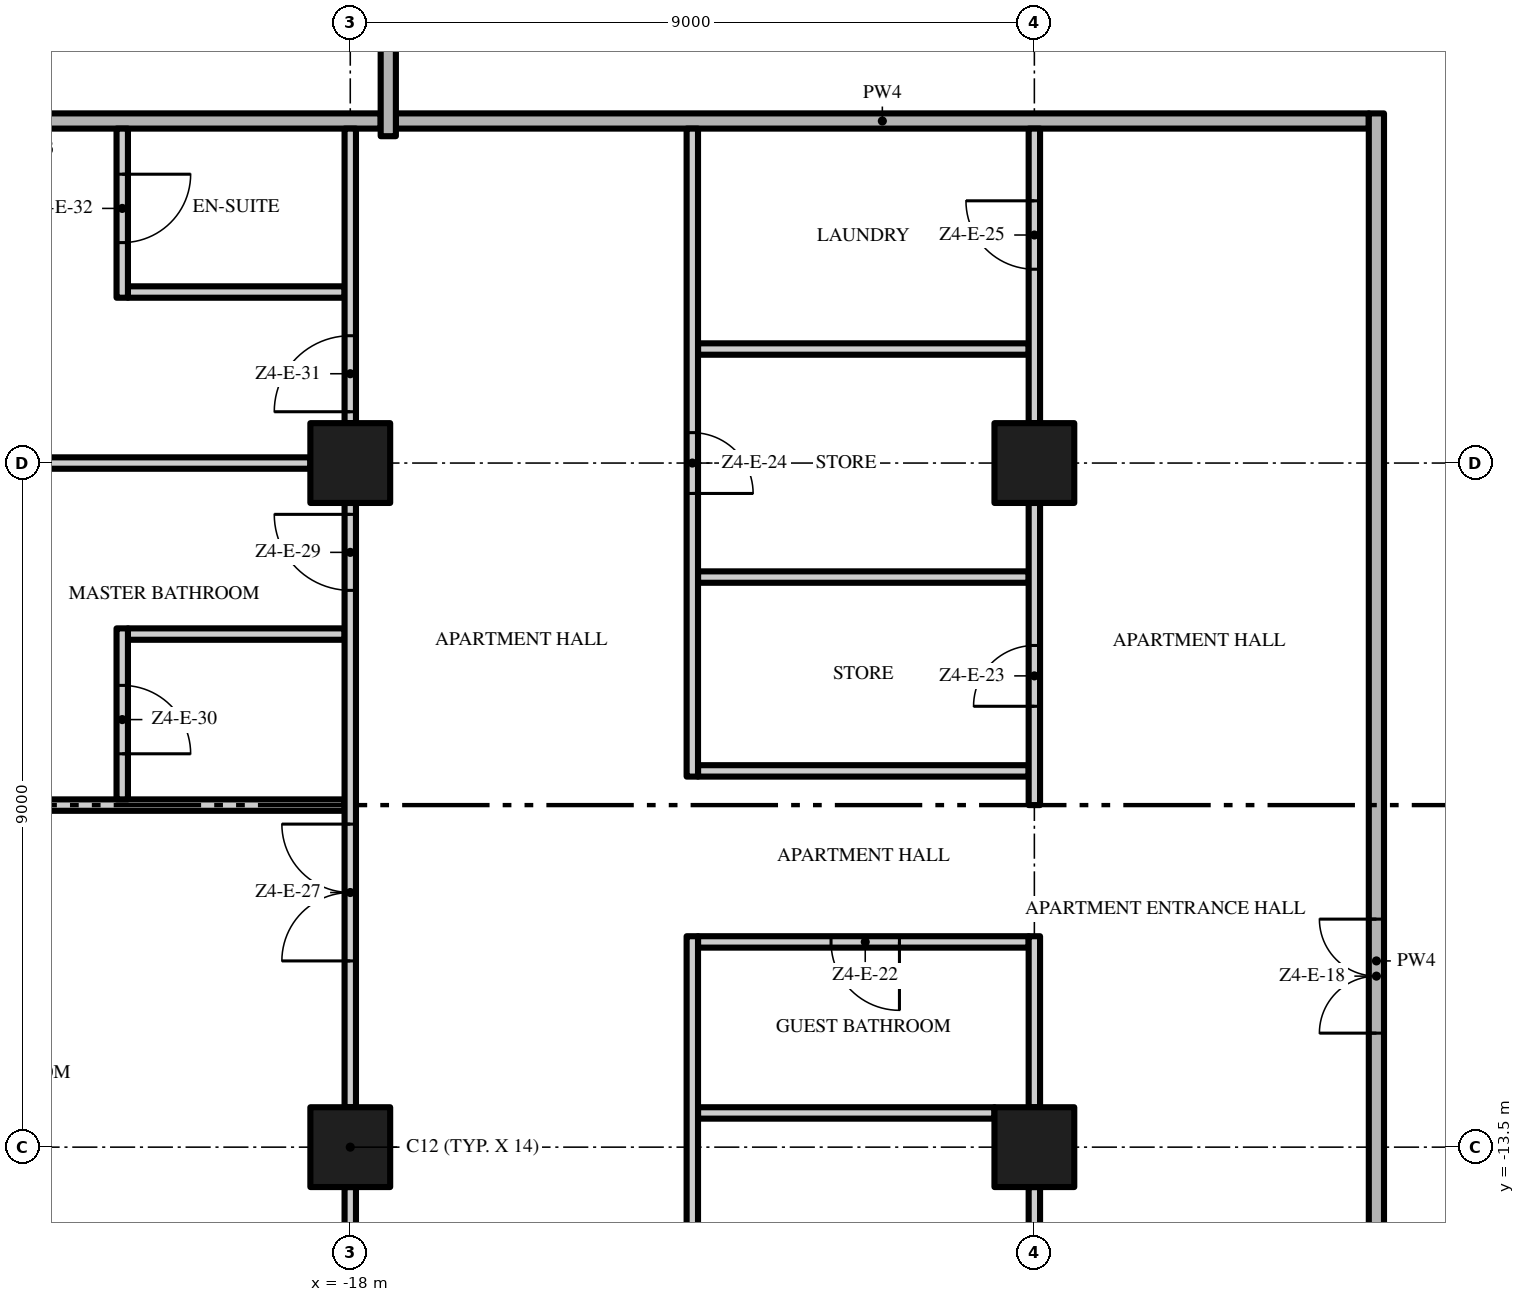
"""IFC4 building model, lengths in metres.
Left out: names, types, materials, properties, quantities, classifications, styles, units other than length and angle.
Written with IfcOpenShell. Run it as: python <this file> out.ifc"""

import sys

from ifc_helpers import new_model, si_unit, direction, frame, frame_2d, origin, origin_2d, place, context, subcontext, project, spatial, rectangle, extrude, element, fill, save


model = new_model("IFC4")
c1 = context("Model", 3, precision=1e-05, world=origin(), true_north=direction((0.0, 1.0)))
c2 = subcontext(c1, "Body", "Model", "MODEL_VIEW")
j1 = project(units=[si_unit("LENGTHUNIT", "METRE"), si_unit("PLANEANGLEUNIT", "RADIAN")], contexts=[c1])
p1 = place(None, origin())
s1 = spatial("IfcSite", under=j1, at=p1, CompositionType="ELEMENT")
p2 = place(p1, origin())
s2 = spatial("IfcBuilding", under=s1, at=p2, CompositionType="ELEMENT")
p3 = place(p2, frame((0.0, 0.0, 230.0)))
s3 = spatial("IfcBuildingStorey", under=s2, at=p3, CompositionType="ELEMENT", Elevation=230.0)
for number, where, z_axis, x_axis in (
    (1, (-18.0, -13.5, 0.0), (0.0, 0.0, 1.0), (1.0, 0.0, 0.0)),
    (2, (-18.0, -4.5, 0.0), (0.0, 0.0, 1.0), (1.0, 0.0, 0.0)),
    (3, (-9.0, -13.5, 0.0), (0.0, 0.0, 1.0), (1.0, 0.0, 0.0)),
    (4, (-9.0, -4.5, 0.0), (0.0, 0.0, 1.0), (1.0, 0.0, 0.0)),
):
    element("IfcColumn", number, at=place(p3, frame(where, z_axis=z_axis, x_axis=x_axis)), inside=s3, PredefinedType="COLUMN", context=c2, shape_type="SweptSolid", body=[
        extrude(rectangle(XDim=1.05, YDim=1.05, at=origin_2d()), origin(), (0.0, 0.0, 1.0), 3.5),
    ])
p4 = place(p3, frame((-13.425, -13.05, 0.0), z_axis=(0.0, 0.0, 1.0), x_axis=(1.0, 0.0, 0.0)))
e5 = element("IfcWall", 5, at=p4, inside=s3, PredefinedType="PARTITIONING", context=c2, shape_type="SweptSolid", body=[
    extrude(rectangle(XDim=3.9, YDim=0.15, at=frame_2d((1.95, 0.0))), origin(), (0.0, 0.0, 1.0), 3.5),
])
p5 = place(p3, frame((-9.075, -10.8, 0.0), z_axis=(0.0, 0.0, 1.0), x_axis=(-1.0, 0.0, 0.0)))
e6 = element("IfcWall", 6, at=p5, inside=s3, PredefinedType="PARTITIONING", context=c2, shape_type="SweptSolid", body=[
    extrude(rectangle(XDim=4.35, YDim=0.15, at=frame_2d((2.175, 0.0))), origin(), (0.0, 0.0, 1.0), 3.5),
])
p6 = place(p5, frame((1.7, 0.0, 0.0)))
e7 = element("IfcOpeningElement", 7, at=p6, cuts=e6, PredefinedType="OPENING", context=c2, shape_type="SweptSolid", body=[
    extrude(rectangle(XDim=0.9, YDim=2.1, at=frame_2d((0.45, 1.05))), frame((0.0, 0.085, 0.0), z_axis=(0.0, -1.0, 0.0), x_axis=(1.0, 0.0, 0.0)), (0.0, 0.0, 1.0), 0.17),
])
p7 = place(p3, frame((-26.7, -9.0, 0.0), z_axis=(0.0, 0.0, 1.0), x_axis=(1.0, 0.0, 0.0)))
e8 = element("IfcWall", 8, at=p7, inside=s3, PredefinedType="PARTITIONING", context=c2, shape_type="SweptSolid", body=[
    extrude(rectangle(XDim=8.625, YDim=0.15, at=frame_2d((4.312, 0.0))), origin(), (0.0, 0.0, 1.0), 3.5),
])
p8 = place(p3, frame((-13.425, -8.55, 0.0), z_axis=(0.0, 0.0, 1.0), x_axis=(1.0, 0.0, 0.0)))
e9 = element("IfcWall", 9, at=p8, inside=s3, PredefinedType="PARTITIONING", context=c2, shape_type="SweptSolid", body=[
    extrude(rectangle(XDim=4.35, YDim=0.15, at=frame_2d((2.175, 0.0))), origin(), (0.0, 0.0, 1.0), 3.5),
])
p9 = place(p3, frame((-20.925, -6.75, 0.0), z_axis=(0.0, 0.0, 1.0), x_axis=(1.0, 0.0, 0.0)))
e10 = element("IfcWall", 10, at=p9, inside=s3, PredefinedType="PARTITIONING", context=c2, shape_type="SweptSolid", body=[
    extrude(rectangle(XDim=2.85, YDim=0.15, at=frame_2d((1.425, 0.0))), origin(), (0.0, 0.0, 1.0), 3.5),
])
p10 = place(p3, frame((-13.425, -6.0, 0.0), z_axis=(0.0, 0.0, 1.0), x_axis=(1.0, 0.0, 0.0)))
e11 = element("IfcWall", 11, at=p10, inside=s3, PredefinedType="PARTITIONING", context=c2, shape_type="SweptSolid", body=[
    extrude(rectangle(XDim=4.35, YDim=0.15, at=frame_2d((2.175, 0.0))), origin(), (0.0, 0.0, 1.0), 3.5),
])
p11 = place(p3, frame((-26.05, -4.5, 0.0), z_axis=(0.0, 0.0, 1.0), x_axis=(1.0, 0.0, 0.0)))
e12 = element("IfcWall", 12, at=p11, inside=s3, PredefinedType="PARTITIONING", context=c2, shape_type="SweptSolid", body=[
    extrude(rectangle(XDim=7.525, YDim=0.15, at=frame_2d((3.763, 0.0))), origin(), (0.0, 0.0, 1.0), 3.5),
])
p12 = place(p3, frame((-13.425, -3.0, 0.0), z_axis=(0.0, 0.0, 1.0), x_axis=(1.0, 0.0, 0.0)))
e13 = element("IfcWall", 13, at=p12, inside=s3, PredefinedType="PARTITIONING", context=c2, shape_type="SweptSolid", body=[
    extrude(rectangle(XDim=4.35, YDim=0.15, at=frame_2d((2.175, 0.0))), origin(), (0.0, 0.0, 1.0), 3.5),
])
p13 = place(p3, frame((-20.925, -2.25, 0.0), z_axis=(0.0, 0.0, 1.0), x_axis=(1.0, 0.0, 0.0)))
e14 = element("IfcWall", 14, at=p13, inside=s3, PredefinedType="PARTITIONING", context=c2, shape_type="SweptSolid", body=[
    extrude(rectangle(XDim=2.85, YDim=0.15, at=frame_2d((1.425, 0.0))), origin(), (0.0, 0.0, 1.0), 3.5),
])
p14 = place(p3, frame((-17.4, 0.0, 0.0), z_axis=(0.0, 0.0, 1.0), x_axis=(1.0, 0.0, 0.0)))
e15 = element("IfcWall", 15, at=p14, inside=s3, PredefinedType="PARTITIONING", context=c2, shape_type="SweptSolid", body=[
    extrude(rectangle(XDim=12.8, YDim=0.2, at=frame_2d((6.4, 0.0))), origin(), (0.0, 0.0, 1.0), 3.5),
])
p15 = place(p3, frame((-26.7, 0.0, 0.0), z_axis=(0.0, 0.0, 1.0), x_axis=(1.0, 0.0, 0.0)))
e16 = element("IfcWall", 16, at=p15, inside=s3, PredefinedType="PARTITIONING", context=c2, shape_type="SweptSolid", body=[
    extrude(rectangle(XDim=9.1, YDim=0.2, at=frame_2d((4.55, 0.0))), origin(), (0.0, 0.0, 1.0), 3.5),
])
p16 = place(p3, frame((-21.0, -6.675, 0.0), z_axis=(0.0, 0.0, 1.0), x_axis=(0.0, -1.0, 0.0)))
e17 = element("IfcWall", 17, at=p16, inside=s3, PredefinedType="PARTITIONING", context=c2, shape_type="SweptSolid", body=[
    extrude(rectangle(XDim=2.25, YDim=0.15, at=frame_2d((1.125, 0.0))), origin(), (0.0, 0.0, 1.0), 3.5),
])
p17 = place(p16, frame((0.75, 0.0, 0.0)))
e18 = element("IfcOpeningElement", 18, at=p17, cuts=e17, PredefinedType="OPENING", context=c2, shape_type="SweptSolid", body=[
    extrude(rectangle(XDim=0.9, YDim=2.1, at=frame_2d((0.45, 1.05))), frame((0.0, 0.085, 0.0), z_axis=(0.0, -1.0, 0.0), x_axis=(1.0, 0.0, 0.0)), (0.0, 0.0, 1.0), 0.17),
])
p18 = place(p3, frame((-21.0, -0.1, 0.0), z_axis=(0.0, 0.0, 1.0), x_axis=(0.0, -1.0, 0.0)))
e19 = element("IfcWall", 19, at=p18, inside=s3, PredefinedType="PARTITIONING", context=c2, shape_type="SweptSolid", body=[
    extrude(rectangle(XDim=2.225, YDim=0.15, at=frame_2d((1.113, 0.0))), origin(), (0.0, 0.0, 1.0), 3.5),
])
p19 = place(p18, frame((0.6, 0.0, 0.0)))
e20 = element("IfcOpeningElement", 20, at=p19, cuts=e19, PredefinedType="OPENING", context=c2, shape_type="SweptSolid", body=[
    extrude(rectangle(XDim=0.9, YDim=2.1, at=frame_2d((0.45, 1.05))), frame((0.0, 0.085, 0.0), z_axis=(0.0, -1.0, 0.0), x_axis=(1.0, 0.0, 0.0)), (0.0, 0.0, 1.0), 0.17),
])
p20 = place(p3, frame((-18.0, -21.55, 0.0), z_axis=(0.0, 0.0, 1.0), x_axis=(0.0, 1.0, 0.0)))
e21 = element("IfcWall", 21, at=p20, inside=s3, PredefinedType="PARTITIONING", context=c2, shape_type="SweptSolid", body=[
    extrude(rectangle(XDim=7.525, YDim=0.15, at=frame_2d((3.763, 0.0))), origin(), (0.0, 0.0, 1.0), 3.5),
])
p21 = place(p20, frame((0.55, 0.0, 0.0)))
e22 = element("IfcOpeningElement", 22, at=p21, cuts=e21, PredefinedType="OPENING", context=c2, shape_type="SweptSolid", body=[
    extrude(rectangle(XDim=1.5, YDim=2.4, at=frame_2d((0.75, 1.2))), frame((0.0, 0.085, 0.0), z_axis=(0.0, -1.0, 0.0), x_axis=(1.0, 0.0, 0.0)), (0.0, 0.0, 1.0), 0.17),
])
p22 = place(p3, frame((-18.0, -12.975, 0.0), z_axis=(0.0, 0.0, 1.0), x_axis=(0.0, 1.0, 0.0)))
e23 = element("IfcWall", 23, at=p22, inside=s3, PredefinedType="PARTITIONING", context=c2, shape_type="SweptSolid", body=[
    extrude(rectangle(XDim=7.95, YDim=0.15, at=frame_2d((3.975, 0.0))), origin(), (0.0, 0.0, 1.0), 3.5),
])
p23 = place(p22, frame((1.925, 0.0, 0.0)))
e24 = element("IfcOpeningElement", 24, at=p23, cuts=e23, PredefinedType="OPENING", context=c2, shape_type="SweptSolid", body=[
    extrude(rectangle(XDim=1.8, YDim=2.4, at=frame_2d((0.9, 1.2))), frame((0.0, 0.085, 0.0), z_axis=(0.0, -1.0, 0.0), x_axis=(1.0, 0.0, 0.0)), (0.0, 0.0, 1.0), 0.17),
])
p24 = place(p22, frame((6.8, 0.0, 0.0)))
e25 = element("IfcOpeningElement", 25, at=p24, cuts=e23, PredefinedType="OPENING", context=c2, shape_type="SweptSolid", body=[
    extrude(rectangle(XDim=1.0, YDim=2.4, at=frame_2d((0.5, 1.2))), frame((0.0, 0.085, 0.0), z_axis=(0.0, -1.0, 0.0), x_axis=(1.0, 0.0, 0.0)), (0.0, 0.0, 1.0), 0.17),
])
p25 = place(p3, frame((-18.0, -3.975, 0.0), z_axis=(0.0, 0.0, 1.0), x_axis=(0.0, 1.0, 0.0)))
e26 = element("IfcWall", 26, at=p25, inside=s3, PredefinedType="PARTITIONING", context=c2, shape_type="SweptSolid", body=[
    extrude(rectangle(XDim=3.875, YDim=0.15, at=frame_2d((1.938, 0.0))), origin(), (0.0, 0.0, 1.0), 3.5),
])
p26 = place(p25, frame((0.15, 0.0, 0.0)))
e27 = element("IfcOpeningElement", 27, at=p26, cuts=e26, PredefinedType="OPENING", context=c2, shape_type="SweptSolid", body=[
    extrude(rectangle(XDim=1.0, YDim=2.4, at=frame_2d((0.5, 1.2))), frame((0.0, 0.085, 0.0), z_axis=(0.0, -1.0, 0.0), x_axis=(1.0, 0.0, 0.0)), (0.0, 0.0, 1.0), 0.17),
])
p27 = place(p3, frame((-17.5, -0.2, 0.0), z_axis=(0.0, 0.0, 1.0), x_axis=(0.0, 1.0, 0.0)))
e28 = element("IfcWall", 28, at=p27, inside=s3, PredefinedType="PARTITIONING", context=c2, shape_type="SweptSolid", body=[
    extrude(rectangle(XDim=4.175, YDim=0.2, at=frame_2d((2.087, 0.0))), origin(), (0.0, 0.0, 1.0), 3.5),
])
p28 = place(p3, frame((-13.5, -10.725, 0.0), z_axis=(0.0, 0.0, 1.0), x_axis=(0.0, -1.0, 0.0)))
e29 = element("IfcWall", 29, at=p28, inside=s3, PredefinedType="PARTITIONING", context=c2, shape_type="SweptSolid", body=[
    extrude(rectangle(XDim=11.475, YDim=0.15, at=frame_2d((5.737, 0.0))), origin(), (0.0, 0.0, 1.0), 3.5),
])
p29 = place(p28, frame((10.475, 0.0, 0.0)))
e30 = element("IfcOpeningElement", 30, at=p29, cuts=e29, PredefinedType="OPENING", context=c2, shape_type="SweptSolid", body=[
    extrude(rectangle(XDim=0.8, YDim=2.0, at=frame_2d((0.4, 1.0))), frame((0.0, 0.085, 0.0), z_axis=(0.0, -1.0, 0.0), x_axis=(1.0, 0.0, 0.0)), (0.0, 0.0, 1.0), 0.17),
])
p30 = place(p28, frame((4.825, 0.0, 0.0)))
e31 = element("IfcOpeningElement", 31, at=p30, cuts=e29, PredefinedType="OPENING", context=c2, shape_type="SweptSolid", body=[
    extrude(rectangle(XDim=1.0, YDim=2.4, at=frame_2d((0.5, 1.2))), frame((0.0, 0.085, 0.0), z_axis=(0.0, -1.0, 0.0), x_axis=(1.0, 0.0, 0.0)), (0.0, 0.0, 1.0), 0.17),
])
p31 = place(p3, frame((-13.5, -0.1, 0.0), z_axis=(0.0, 0.0, 1.0), x_axis=(0.0, -1.0, 0.0)))
e32 = element("IfcWall", 32, at=p31, inside=s3, PredefinedType="PARTITIONING", context=c2, shape_type="SweptSolid", body=[
    extrude(rectangle(XDim=8.525, YDim=0.15, at=frame_2d((4.263, 0.0))), origin(), (0.0, 0.0, 1.0), 3.5),
])
p32 = place(p31, frame((4.0, 0.0, 0.0)))
e33 = element("IfcOpeningElement", 33, at=p32, cuts=e32, PredefinedType="OPENING", context=c2, shape_type="SweptSolid", body=[
    extrude(rectangle(XDim=0.8, YDim=2.0, at=frame_2d((0.4, 1.0))), frame((0.0, 0.085, 0.0), z_axis=(0.0, -1.0, 0.0), x_axis=(1.0, 0.0, 0.0)), (0.0, 0.0, 1.0), 0.17),
])
p33 = place(p3, frame((-9.0, -21.55, 0.0), z_axis=(0.0, 0.0, 1.0), x_axis=(0.0, 1.0, 0.0)))
e34 = element("IfcWall", 34, at=p33, inside=s3, PredefinedType="PARTITIONING", context=c2, shape_type="SweptSolid", body=[
    extrude(rectangle(XDim=7.525, YDim=0.15, at=frame_2d((3.763, 0.0))), origin(), (0.0, 0.0, 1.0), 3.5),
])
p34 = place(p33, frame((1.25, 0.0, 0.0)))
e35 = element("IfcOpeningElement", 35, at=p34, cuts=e34, PredefinedType="OPENING", context=c2, shape_type="SweptSolid", body=[
    extrude(rectangle(XDim=0.8, YDim=2.0, at=frame_2d((0.4, 1.0))), frame((0.0, 0.085, 0.0), z_axis=(0.0, -1.0, 0.0), x_axis=(1.0, 0.0, 0.0)), (0.0, 0.0, 1.0), 0.17),
])
p35 = place(p3, frame((-9.0, -12.975, 0.0), z_axis=(0.0, 0.0, 1.0), x_axis=(0.0, 1.0, 0.0)))
e36 = element("IfcWall", 36, at=p35, inside=s3, PredefinedType="PARTITIONING", context=c2, shape_type="SweptSolid", body=[
    extrude(rectangle(XDim=2.25, YDim=0.15, at=frame_2d((1.125, 0.0))), origin(), (0.0, 0.0, 1.0), 3.5),
])
p36 = place(p3, frame((-9.0, -9.0, 0.0), z_axis=(0.0, 0.0, 1.0), x_axis=(0.0, 1.0, 0.0)))
e37 = element("IfcWall", 37, at=p36, inside=s3, PredefinedType="PARTITIONING", context=c2, shape_type="SweptSolid", body=[
    extrude(rectangle(XDim=3.975, YDim=0.15, at=frame_2d((1.988, 0.0))), origin(), (0.0, 0.0, 1.0), 3.5),
])
p37 = place(p36, frame((1.3, 0.0, 0.0)))
e38 = element("IfcOpeningElement", 38, at=p37, cuts=e37, PredefinedType="OPENING", context=c2, shape_type="SweptSolid", body=[
    extrude(rectangle(XDim=0.8, YDim=2.0, at=frame_2d((0.4, 1.0))), frame((0.0, 0.085, 0.0), z_axis=(0.0, -1.0, 0.0), x_axis=(1.0, 0.0, 0.0)), (0.0, 0.0, 1.0), 0.17),
])
p38 = place(p3, frame((-9.0, -3.975, 0.0), z_axis=(0.0, 0.0, 1.0), x_axis=(0.0, 1.0, 0.0)))
e39 = element("IfcWall", 39, at=p38, inside=s3, PredefinedType="PARTITIONING", context=c2, shape_type="SweptSolid", body=[
    extrude(rectangle(XDim=3.875, YDim=0.15, at=frame_2d((1.938, 0.0))), origin(), (0.0, 0.0, 1.0), 3.5),
])
p39 = place(p38, frame((2.025, 0.0, 0.0)))
e40 = element("IfcOpeningElement", 40, at=p39, cuts=e39, PredefinedType="OPENING", context=c2, shape_type="SweptSolid", body=[
    extrude(rectangle(XDim=0.9, YDim=2.1, at=frame_2d((0.45, 1.05))), frame((0.0, 0.085, 0.0), z_axis=(0.0, -1.0, 0.0), x_axis=(1.0, 0.0, 0.0)), (0.0, 0.0, 1.0), 0.17),
])
p40 = place(p3, frame((-4.5, -22.2, 0.0), z_axis=(0.0, 0.0, 1.0), x_axis=(0.0, 1.0, 0.0)))
e41 = element("IfcWall", 41, at=p40, inside=s3, PredefinedType="PARTITIONING", context=c2, shape_type="SweptSolid", body=[
    extrude(rectangle(XDim=22.3, YDim=0.2, at=frame_2d((11.15, 0.0))), origin(), (0.0, 0.0, 1.0), 3.5),
])
p41 = place(p40, frame((10.2, 0.0, 0.0)))
e42 = element("IfcOpeningElement", 42, at=p41, cuts=e41, PredefinedType="OPENING", context=c2, shape_type="SweptSolid", body=[
    extrude(rectangle(XDim=1.5, YDim=2.4, at=frame_2d((0.75, 1.2))), frame((0.0, 0.11, 0.0), z_axis=(0.0, -1.0, 0.0), x_axis=(1.0, 0.0, 0.0)), (0.0, 0.0, 1.0), 0.22),
])
p42 = place(p41, origin())
e43 = element("IfcDoor", 43, at=p42, inside=s3, OperationType="DOUBLE_DOOR_SINGLE_SWING", PredefinedType="DOOR", context=c2, shape_type="SweptSolid", body=[
    extrude(rectangle(XDim=1.5, YDim=2.4, at=frame_2d((0.75, 1.2))), frame((0.0, 0.025, 0.0), z_axis=(0.0, -1.0, 0.0), x_axis=(1.0, 0.0, 0.0)), (0.0, 0.0, 1.0), 0.05),
])
fill(e42, e43)
p43 = place(p6, origin())
e44 = element("IfcDoor", 44, at=p43, inside=s3, OperationType="SINGLE_SWING_LEFT", PredefinedType="DOOR", context=c2, shape_type="SweptSolid", body=[
    extrude(rectangle(XDim=0.9, YDim=2.1, at=frame_2d((0.45, 1.05))), frame((0.0, 0.025, 0.0), z_axis=(0.0, -1.0, 0.0), x_axis=(1.0, 0.0, 0.0)), (0.0, 0.0, 1.0), 0.05),
])
fill(e7, e44)
p44 = place(p37, origin())
e45 = element("IfcDoor", 45, at=p44, inside=s3, OperationType="SINGLE_SWING_LEFT", PredefinedType="DOOR", context=c2, shape_type="SweptSolid", body=[
    extrude(rectangle(XDim=0.8, YDim=2.0, at=frame_2d((0.4, 1.0))), frame((0.0, 0.025, 0.0), z_axis=(0.0, -1.0, 0.0), x_axis=(1.0, 0.0, 0.0)), (0.0, 0.0, 1.0), 0.05),
])
fill(e38, e45)
p45 = place(p32, origin())
e46 = element("IfcDoor", 46, at=p45, inside=s3, OperationType="SINGLE_SWING_RIGHT", PredefinedType="DOOR", context=c2, shape_type="SweptSolid", body=[
    extrude(rectangle(XDim=0.8, YDim=2.0, at=frame_2d((0.4, 1.0))), frame((0.0, 0.025, 0.0), z_axis=(0.0, -1.0, 0.0), x_axis=(1.0, 0.0, 0.0)), (0.0, 0.0, 1.0), 0.05),
])
fill(e33, e46)
p46 = place(p39, origin())
e47 = element("IfcDoor", 47, at=p46, inside=s3, OperationType="SINGLE_SWING_RIGHT", PredefinedType="DOOR", context=c2, shape_type="SweptSolid", body=[
    extrude(rectangle(XDim=0.9, YDim=2.1, at=frame_2d((0.45, 1.05))), frame((0.0, 0.025, 0.0), z_axis=(0.0, -1.0, 0.0), x_axis=(1.0, 0.0, 0.0)), (0.0, 0.0, 1.0), 0.05),
])
fill(e40, e47)
p47 = place(p23, origin())
e48 = element("IfcDoor", 48, at=p47, inside=s3, OperationType="DOUBLE_DOOR_SINGLE_SWING", PredefinedType="DOOR", context=c2, shape_type="SweptSolid", body=[
    extrude(rectangle(XDim=1.8, YDim=2.4, at=frame_2d((0.9, 1.2))), frame((0.0, 0.025, 0.0), z_axis=(0.0, -1.0, 0.0), x_axis=(1.0, 0.0, 0.0)), (0.0, 0.0, 1.0), 0.05),
])
fill(e24, e48)
p48 = place(p24, origin())
e49 = element("IfcDoor", 49, at=p48, inside=s3, OperationType="SINGLE_SWING_RIGHT", PredefinedType="DOOR", context=c2, shape_type="SweptSolid", body=[
    extrude(rectangle(XDim=1.0, YDim=2.4, at=frame_2d((0.5, 1.2))), frame((0.0, 0.025, 0.0), z_axis=(0.0, -1.0, 0.0), x_axis=(1.0, 0.0, 0.0)), (0.0, 0.0, 1.0), 0.05),
])
fill(e25, e49)
p49 = place(p17, origin())
e50 = element("IfcDoor", 50, at=p49, inside=s3, OperationType="SINGLE_SWING_RIGHT", PredefinedType="DOOR", context=c2, shape_type="SweptSolid", body=[
    extrude(rectangle(XDim=0.9, YDim=2.1, at=frame_2d((0.45, 1.05))), frame((0.0, 0.025, 0.0), z_axis=(0.0, -1.0, 0.0), x_axis=(1.0, 0.0, 0.0)), (0.0, 0.0, 1.0), 0.05),
])
fill(e18, e50)
p50 = place(p26, origin())
e51 = element("IfcDoor", 51, at=p50, inside=s3, OperationType="SINGLE_SWING_LEFT", PredefinedType="DOOR", context=c2, shape_type="SweptSolid", body=[
    extrude(rectangle(XDim=1.0, YDim=2.4, at=frame_2d((0.5, 1.2))), frame((0.0, 0.025, 0.0), z_axis=(0.0, -1.0, 0.0), x_axis=(1.0, 0.0, 0.0)), (0.0, 0.0, 1.0), 0.05),
])
fill(e27, e51)
p51 = place(p19, origin())
e52 = element("IfcDoor", 52, at=p51, inside=s3, OperationType="SINGLE_SWING_LEFT", PredefinedType="DOOR", context=c2, shape_type="SweptSolid", body=[
    extrude(rectangle(XDim=0.9, YDim=2.1, at=frame_2d((0.45, 1.05))), frame((0.0, 0.025, 0.0), z_axis=(0.0, -1.0, 0.0), x_axis=(1.0, 0.0, 0.0)), (0.0, 0.0, 1.0), 0.05),
])
fill(e20, e52)
save(model, sys.argv[1])
